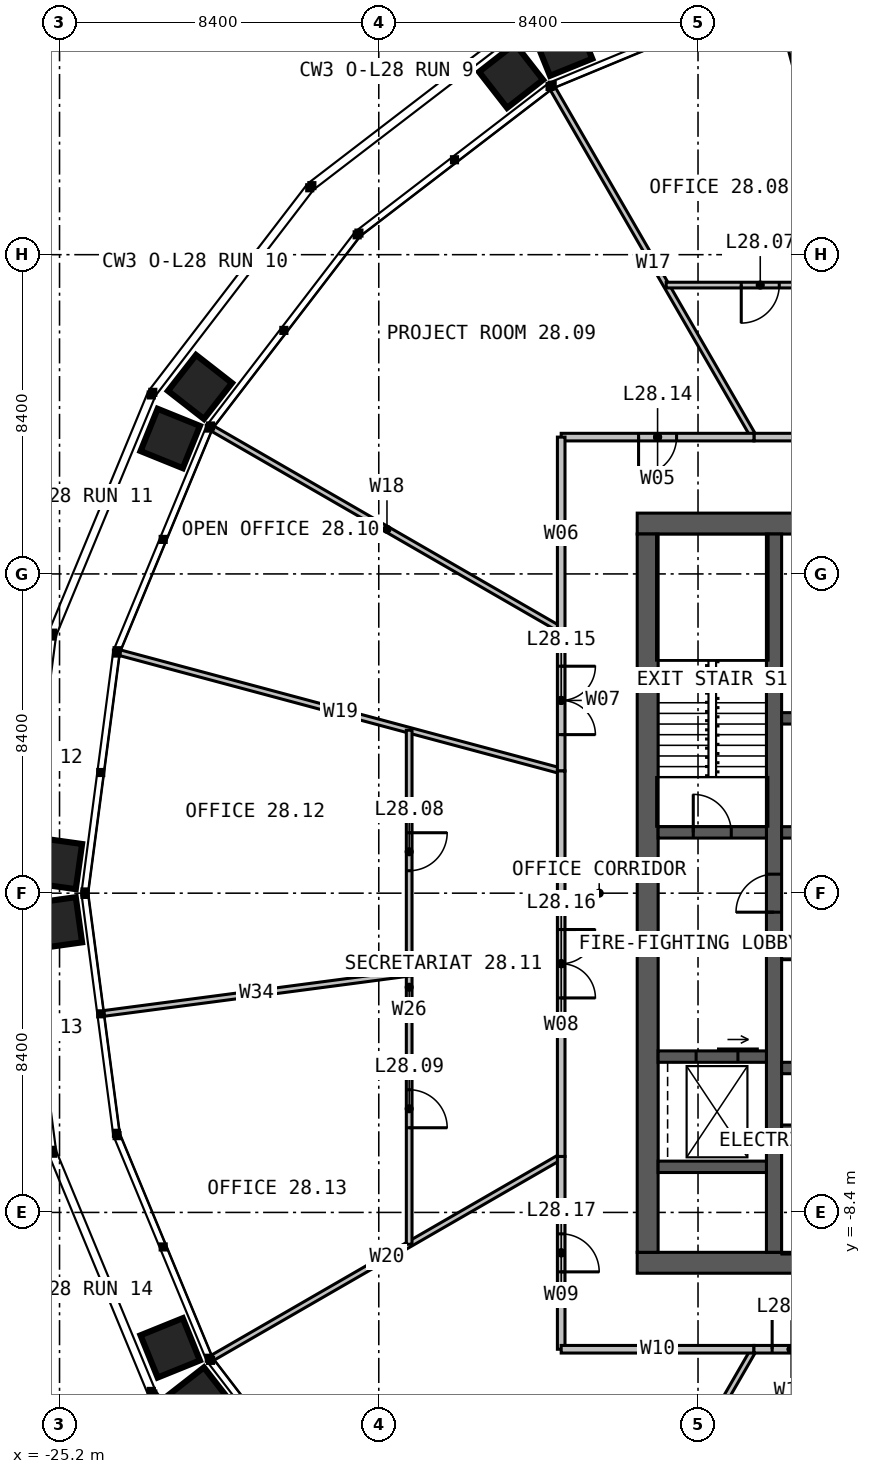
"""IFC4 building model, lengths in metres.
Left out: names, types, materials, properties, quantities, classifications, styles, units other than length and angle.
Written with IfcOpenShell. Run it as: python <this file> out.ifc"""

import sys

from ifc_helpers import new_model, si_unit, direction, frame, frame_2d, origin, place, context, subcontext, project, spatial, rectangle, extrude, element, fill, save


model = new_model("IFC4")
c1 = context("Model", 3, precision=1e-05, world=origin(), true_north=direction((0.0, 1.0)))
c2 = subcontext(c1, "Body", "Model", "MODEL_VIEW")
j1 = project(units=[si_unit("LENGTHUNIT", "METRE"), si_unit("PLANEANGLEUNIT", "RADIAN")], contexts=[c1])
p1 = place(None, origin())
s1 = spatial("IfcSite", under=j1, at=p1, CompositionType="ELEMENT")
p2 = place(p1, origin())
s2 = spatial("IfcBuilding", under=s1, at=p2, CompositionType="ELEMENT")
p3 = place(p2, frame((0.0, 0.0, 118.0)))
s3 = spatial("IfcBuildingStorey", under=s2, at=p3, CompositionType="ELEMENT", Elevation=118.0)
p4 = place(p3, frame((-10.0, 9.725, 0.0), z_axis=(0.0, 0.0, 1.0), x_axis=(1.0, 0.0, 0.0)))
e1 = element("IfcWall", 1, at=p4, inside=s3, PredefinedType="SOLIDWALL", context=c2, shape_type="SweptSolid", body=[
    extrude(rectangle(XDim=20.0, YDim=0.55, at=frame_2d((10.0, 0.0))), origin(), (0.0, 0.0, 1.0), 4.0),
])
p5 = place(p4, frame((9.4, 0.0, 0.0)))
e2 = element("IfcOpeningElement", 2, at=p5, cuts=e1, PredefinedType="OPENING", context=c2, shape_type="SweptSolid", body=[
    extrude(rectangle(XDim=1.2, YDim=2.2, at=frame_2d((0.6, 1.1))), frame((0.0, 0.285, 0.0), z_axis=(0.0, -1.0, 0.0), x_axis=(1.0, 0.0, 0.0)), (0.0, 0.0, 1.0), 0.57),
])
p6 = place(p3, frame((10.0, -9.725, 0.0), z_axis=(0.0, 0.0, 1.0), x_axis=(-1.0, 0.0, 0.0)))
e3 = element("IfcWall", 3, at=p6, inside=s3, PredefinedType="SOLIDWALL", context=c2, shape_type="SweptSolid", body=[
    extrude(rectangle(XDim=20.0, YDim=0.55, at=frame_2d((10.0, 0.0))), origin(), (0.0, 0.0, 1.0), 4.0),
])
p7 = place(p6, frame((6.875, 0.0, 0.0)))
e4 = element("IfcOpeningElement", 4, at=p7, cuts=e3, PredefinedType="OPENING", context=c2, shape_type="SweptSolid", body=[
    extrude(rectangle(XDim=1.2, YDim=2.2, at=frame_2d((0.6, 1.1))), frame((0.0, 0.285, 0.0), z_axis=(0.0, -1.0, 0.0), x_axis=(1.0, 0.0, 0.0)), (0.0, 0.0, 1.0), 0.57),
])
p8 = place(p3, frame((-9.725, 9.45, 0.0), z_axis=(0.0, 0.0, 1.0), x_axis=(0.0, -1.0, 0.0)))
e5 = element("IfcWall", 5, at=p8, inside=s3, PredefinedType="SOLIDWALL", context=c2, shape_type="SweptSolid", body=[
    extrude(rectangle(XDim=18.9, YDim=0.55, at=frame_2d((9.45, 0.0))), origin(), (0.0, 0.0, 1.0), 4.0),
])
p9 = place(p3, frame((-6.4, -9.45, 0.0), z_axis=(0.0, 0.0, 1.0), x_axis=(0.0, 1.0, 0.0)))
e6 = element("IfcWall", 6, at=p9, inside=s3, PredefinedType="SOLIDWALL", context=c2, shape_type="SweptSolid", body=[
    extrude(rectangle(XDim=18.9, YDim=0.4, at=frame_2d((9.45, 0.0))), origin(), (0.0, 0.0, 1.0), 4.0),
])
p10 = place(p9, frame((8.95, 0.0, 0.0)))
e7 = element("IfcOpeningElement", 7, at=p10, cuts=e6, PredefinedType="OPENING", context=c2, shape_type="SweptSolid", body=[
    extrude(rectangle(XDim=1.0, YDim=2.2, at=frame_2d((0.5, 1.1))), frame((0.0, 0.21, 0.0), z_axis=(0.0, -1.0, 0.0), x_axis=(1.0, 0.0, 0.0)), (0.0, 0.0, 1.0), 0.42),
])
p11 = place(p3, frame((-6.2, 1.6, 0.0), z_axis=(0.0, 0.0, 1.0), x_axis=(1.0, 0.0, 0.0)))
e8 = element("IfcWall", 8, at=p11, inside=s3, PredefinedType="SOLIDWALL", context=c2, shape_type="SweptSolid", body=[
    extrude(rectangle(XDim=4.85, YDim=0.3, at=frame_2d((2.425, 0.0))), origin(), (0.0, 0.0, 1.0), 4.0),
])
p12 = place(p11, frame((0.625, 0.0, 0.0)))
e9 = element("IfcOpeningElement", 9, at=p12, cuts=e8, PredefinedType="OPENING", context=c2, shape_type="SweptSolid", body=[
    extrude(rectangle(XDim=1.1, YDim=2.2, at=frame_2d((0.55, 1.1))), frame((0.0, 0.16, 0.0), z_axis=(0.0, -1.0, 0.0), x_axis=(1.0, 0.0, 0.0)), (0.0, 0.0, 1.0), 0.32),
])
p13 = place(p11, frame((3.15, 0.0, 0.0)))
e10 = element("IfcOpeningElement", 10, at=p13, cuts=e8, PredefinedType="OPENING", context=c2, shape_type="SweptSolid", body=[
    extrude(rectangle(XDim=1.1, YDim=2.2, at=frame_2d((0.55, 1.1))), frame((0.0, 0.16, 0.0), z_axis=(0.0, -1.0, 0.0), x_axis=(1.0, 0.0, 0.0)), (0.0, 0.0, 1.0), 0.32),
])
p14 = place(p3, frame((-6.2, 4.6, 0.0), z_axis=(0.0, 0.0, 1.0), x_axis=(1.0, 0.0, 0.0)))
e11 = element("IfcWall", 11, at=p14, inside=s3, PredefinedType="SOLIDWALL", context=c2, shape_type="SweptSolid", body=[
    extrude(rectangle(XDim=4.85, YDim=0.3, at=frame_2d((2.425, 0.0))), origin(), (0.0, 0.0, 1.0), 4.0),
])
for number, where, z_axis, x_axis in (
    (12, (-6.2, -1.6, 0.0), (0.0, 0.0, 1.0), (1.0, 0.0, 0.0)),
    (13, (-6.2, -4.6, 0.0), (0.0, 0.0, 1.0), (1.0, 0.0, 0.0)),
):
    element("IfcWall", number, at=place(p3, frame(where, z_axis=z_axis, x_axis=x_axis)), inside=s3, PredefinedType="SOLIDWALL", context=c2, shape_type="SweptSolid", body=[
        extrude(rectangle(XDim=7.4, YDim=0.3, at=frame_2d((3.7, 0.0))), origin(), (0.0, 0.0, 1.0), 4.0),
    ])
p15 = place(p3, frame((-6.2, -6.2, 0.0), z_axis=(0.0, 0.0, 1.0), x_axis=(1.0, 0.0, 0.0)))
e14 = element("IfcWall", 14, at=p15, inside=s3, PredefinedType="SOLIDWALL", context=c2, shape_type="SweptSolid", body=[
    extrude(rectangle(XDim=7.4, YDim=0.2, at=frame_2d((3.7, 0.0))), origin(), (0.0, 0.0, 1.0), 4.0),
])
p16 = place(p3, frame((-9.45, 1.6, 0.0), z_axis=(0.0, 0.0, 1.0), x_axis=(1.0, 0.0, 0.0)))
e15 = element("IfcWall", 15, at=p16, inside=s3, PredefinedType="SOLIDWALL", context=c2, shape_type="SweptSolid", body=[
    extrude(rectangle(XDim=2.85, YDim=0.3, at=frame_2d((1.425, 0.0))), origin(), (0.0, 0.0, 1.0), 4.0),
])
p17 = place(p16, frame((0.925, 0.0, 0.0)))
e16 = element("IfcOpeningElement", 16, at=p17, cuts=e15, PredefinedType="OPENING", context=c2, shape_type="SweptSolid", body=[
    extrude(rectangle(XDim=1.0, YDim=2.2, at=frame_2d((0.5, 1.1))), frame((0.0, 0.16, 0.0), z_axis=(0.0, -1.0, 0.0), x_axis=(1.0, 0.0, 0.0)), (0.0, 0.0, 1.0), 0.32),
])
p18 = place(p3, frame((-9.45, -4.3, 0.0), z_axis=(0.0, 0.0, 1.0), x_axis=(1.0, 0.0, 0.0)))
e17 = element("IfcWall", 17, at=p18, inside=s3, PredefinedType="SOLIDWALL", context=c2, shape_type="SweptSolid", body=[
    extrude(rectangle(XDim=2.85, YDim=0.3, at=frame_2d((1.425, 0.0))), origin(), (0.0, 0.0, 1.0), 4.0),
])
p19 = place(p18, frame((1.0, 0.0, 0.0)))
e18 = element("IfcOpeningElement", 18, at=p19, cuts=e17, PredefinedType="OPENING", context=c2, shape_type="SweptSolid", body=[
    extrude(rectangle(XDim=1.1, YDim=2.2, at=frame_2d((0.55, 1.1))), frame((0.0, 0.16, 0.0), z_axis=(0.0, -1.0, 0.0), x_axis=(1.0, 0.0, 0.0)), (0.0, 0.0, 1.0), 0.32),
])
p20 = place(p3, frame((-9.45, -7.2, 0.0), z_axis=(0.0, 0.0, 1.0), x_axis=(1.0, 0.0, 0.0)))
e19 = element("IfcWall", 19, at=p20, inside=s3, PredefinedType="SOLIDWALL", context=c2, shape_type="SweptSolid", body=[
    extrude(rectangle(XDim=2.85, YDim=0.3, at=frame_2d((1.425, 0.0))), origin(), (0.0, 0.0, 1.0), 4.0),
])
for number, where, z_axis, x_axis in (
    (20, (-6.928, 12.0, 0.0), (0.0, 0.0, 1.0), (-0.5, 0.866, 0.0)),
    (21, (-12.0, 6.928, 0.0), (0.0, 0.0, 1.0), (-0.866, 0.5, 0.0)),
):
    element("IfcWall", number, at=place(p3, frame(where, z_axis=z_axis, x_axis=x_axis)), inside=s3, PredefinedType="PARTITIONING", context=c2, shape_type="SweptSolid", body=[
        extrude(rectangle(XDim=10.587, YDim=0.15, at=frame_2d((5.293, 0.0))), origin(), (0.0, 0.0, 1.0), 2.79),
    ])
p21 = place(p3, frame((-12.0, 3.215, 0.0), z_axis=(0.0, 0.0, 1.0), x_axis=(-0.965923753467, 0.258826780857, 0.0)))
e22 = element("IfcWall", 22, at=p21, inside=s3, PredefinedType="PARTITIONING", context=c2, shape_type="SweptSolid", body=[
    extrude(rectangle(XDim=12.02, YDim=0.15, at=frame_2d((6.01, 0.0))), origin(), (0.0, 0.0, 1.0), 2.79),
])
for number, where, z_axis, x_axis in (
    (23, (-12.0, -6.928, 0.0), (0.0, 0.0, 1.0), (-0.866, -0.5, 0.0)),
    (24, (-6.928, -12.0, 0.0), (0.0, 0.0, 1.0), (-0.5, -0.866, 0.0)),
):
    element("IfcWall", number, at=place(p3, frame(where, z_axis=z_axis, x_axis=x_axis)), inside=s3, PredefinedType="PARTITIONING", context=c2, shape_type="SweptSolid", body=[
        extrude(rectangle(XDim=10.587, YDim=0.15, at=frame_2d((5.293, 0.0))), origin(), (0.0, 0.0, 1.0), 2.79),
    ])
p22 = place(p3, frame((-4.97, -12.0, 0.0), z_axis=(0.0, 0.0, 1.0), x_axis=(-0.382686061022, -0.923878443682, 0.0)))
e25 = element("IfcWall", 25, at=p22, inside=s3, PredefinedType="PARTITIONING", context=c2, shape_type="SweptSolid", body=[
    extrude(rectangle(XDim=11.245, YDim=0.15, at=frame_2d((5.623, 0.0))), origin(), (0.0, 0.0, 1.0), 2.79),
])
p23 = place(p3, frame((9.238, 16.0, 0.0), z_axis=(0.0, 0.0, 1.0), x_axis=(-1.0, 0.0, 0.0)))
e26 = element("IfcWall", 26, at=p23, inside=s3, PredefinedType="PARTITIONING", context=c2, shape_type="SweptSolid", body=[
    extrude(rectangle(XDim=18.475, YDim=0.15, at=frame_2d((9.238, 0.0))), origin(), (0.0, 0.0, 1.0), 2.79),
])
p24 = place(p23, frame((1.975, 0.0, 0.0)))
e27 = element("IfcOpeningElement", 27, at=p24, cuts=e26, PredefinedType="OPENING", context=c2, shape_type="SweptSolid", body=[
    extrude(rectangle(XDim=1.0, YDim=2.2, at=frame_2d((0.5, 1.1))), frame((0.0, 0.085, 0.0), z_axis=(0.0, -1.0, 0.0), x_axis=(1.0, 0.0, 0.0)), (0.0, 0.0, 1.0), 0.17),
])
p25 = place(p23, frame((6.594, 0.0, 0.0)))
e28 = element("IfcOpeningElement", 28, at=p25, cuts=e26, PredefinedType="OPENING", context=c2, shape_type="SweptSolid", body=[
    extrude(rectangle(XDim=1.0, YDim=2.2, at=frame_2d((0.5, 1.1))), frame((0.0, 0.085, 0.0), z_axis=(0.0, -1.0, 0.0), x_axis=(1.0, 0.0, 0.0)), (0.0, 0.0, 1.0), 0.17),
])
p26 = place(p23, frame((10.881, 0.0, 0.0)))
e29 = element("IfcOpeningElement", 29, at=p26, cuts=e26, PredefinedType="OPENING", context=c2, shape_type="SweptSolid", body=[
    extrude(rectangle(XDim=1.0, YDim=2.2, at=frame_2d((0.5, 1.1))), frame((0.0, 0.085, 0.0), z_axis=(0.0, -1.0, 0.0), x_axis=(1.0, 0.0, 0.0)), (0.0, 0.0, 1.0), 0.17),
])
p27 = place(p23, frame((15.5, 0.0, 0.0)))
e30 = element("IfcOpeningElement", 30, at=p27, cuts=e26, PredefinedType="OPENING", context=c2, shape_type="SweptSolid", body=[
    extrude(rectangle(XDim=1.0, YDim=2.2, at=frame_2d((0.5, 1.1))), frame((0.0, 0.085, 0.0), z_axis=(0.0, -1.0, 0.0), x_axis=(1.0, 0.0, 0.0)), (0.0, 0.0, 1.0), 0.17),
])
p28 = place(p3, frame((-4.287, 16.0, 0.0), z_axis=(0.0, 0.0, 1.0), x_axis=(-0.258833147156, 0.965922047545, 0.0)))
e31 = element("IfcWall", 31, at=p28, inside=s3, PredefinedType="PARTITIONING", context=c2, shape_type="SweptSolid", body=[
    extrude(rectangle(XDim=7.879, YDim=0.15, at=frame_2d((3.939, 0.0))), origin(), (0.0, 0.0, 1.0), 2.79),
])
p29 = place(p3, frame((6.928, 12.0, 0.0), z_axis=(0.0, 0.0, 1.0), x_axis=(-1.0, 0.0, 0.0)))
e32 = element("IfcWall", 32, at=p29, inside=s3, PredefinedType="PARTITIONING", context=c2, shape_type="SweptSolid", body=[
    extrude(rectangle(XDim=13.856, YDim=0.2, at=frame_2d((6.928, 0.0))), origin(), (0.0, 0.0, 1.0), 3.8),
])
p30 = place(p29, frame((6.028, 0.0, 0.0)))
e33 = element("IfcOpeningElement", 33, at=p30, cuts=e32, PredefinedType="OPENING", context=c2, shape_type="SweptSolid", body=[
    extrude(rectangle(XDim=1.8, YDim=2.2, at=frame_2d((0.9, 1.1))), frame((0.0, 0.11, 0.0), z_axis=(0.0, -1.0, 0.0), x_axis=(1.0, 0.0, 0.0)), (0.0, 0.0, 1.0), 0.22),
])
p31 = place(p3, frame((-6.928, 12.0, 0.0), z_axis=(0.0, 0.0, 1.0), x_axis=(-1.0, 0.0, 0.0)))
e34 = element("IfcWall", 34, at=p31, inside=s3, PredefinedType="PARTITIONING", context=c2, shape_type="SweptSolid", body=[
    extrude(rectangle(XDim=5.072, YDim=0.2, at=frame_2d((2.536, 0.0))), origin(), (0.0, 0.0, 1.0), 3.8),
])
p32 = place(p31, frame((2.036, 0.0, 0.0)))
e35 = element("IfcOpeningElement", 35, at=p32, cuts=e34, PredefinedType="OPENING", context=c2, shape_type="SweptSolid", body=[
    extrude(rectangle(XDim=1.0, YDim=2.2, at=frame_2d((0.5, 1.1))), frame((0.0, 0.11, 0.0), z_axis=(0.0, -1.0, 0.0), x_axis=(1.0, 0.0, 0.0)), (0.0, 0.0, 1.0), 0.22),
])
p33 = place(p3, frame((-12.0, 12.0, 0.0), z_axis=(0.0, 0.0, 1.0), x_axis=(0.0, -1.0, 0.0)))
e36 = element("IfcWall", 36, at=p33, inside=s3, PredefinedType="PARTITIONING", context=c2, shape_type="SweptSolid", body=[
    extrude(rectangle(XDim=5.072, YDim=0.2, at=frame_2d((2.536, 0.0))), origin(), (0.0, 0.0, 1.0), 3.8),
])
p34 = place(p3, frame((-12.0, 6.928, 0.0), z_axis=(0.0, 0.0, 1.0), x_axis=(0.0, -1.0, 0.0)))
e37 = element("IfcWall", 37, at=p34, inside=s3, PredefinedType="PARTITIONING", context=c2, shape_type="SweptSolid", body=[
    extrude(rectangle(XDim=3.713, YDim=0.2, at=frame_2d((1.856, 0.0))), origin(), (0.0, 0.0, 1.0), 3.8),
])
p35 = place(p34, frame((0.956, 0.0, 0.0)))
e38 = element("IfcOpeningElement", 38, at=p35, cuts=e37, PredefinedType="OPENING", context=c2, shape_type="SweptSolid", body=[
    extrude(rectangle(XDim=1.8, YDim=2.2, at=frame_2d((0.9, 1.1))), frame((0.0, 0.11, 0.0), z_axis=(0.0, -1.0, 0.0), x_axis=(1.0, 0.0, 0.0)), (0.0, 0.0, 1.0), 0.22),
])
p36 = place(p3, frame((-16.0, 4.287, 0.0), z_axis=(0.0, 0.0, 1.0), x_axis=(0.0, -1.0, 0.0)))
e39 = element("IfcWall", 39, at=p36, inside=s3, PredefinedType="PARTITIONING", context=c2, shape_type="SweptSolid", body=[
    extrude(rectangle(XDim=13.525, YDim=0.15, at=frame_2d((6.762, 0.0))), origin(), (0.0, 0.0, 1.0), 2.79),
])
p37 = place(p36, frame((2.697, 0.0, 0.0)))
e40 = element("IfcOpeningElement", 40, at=p37, cuts=e39, PredefinedType="OPENING", context=c2, shape_type="SweptSolid", body=[
    extrude(rectangle(XDim=1.0, YDim=2.2, at=frame_2d((0.5, 1.1))), frame((0.0, 0.085, 0.0), z_axis=(0.0, -1.0, 0.0), x_axis=(1.0, 0.0, 0.0)), (0.0, 0.0, 1.0), 0.17),
])
p38 = place(p36, frame((9.459, 0.0, 0.0)))
e41 = element("IfcOpeningElement", 41, at=p38, cuts=e39, PredefinedType="OPENING", context=c2, shape_type="SweptSolid", body=[
    extrude(rectangle(XDim=1.0, YDim=2.2, at=frame_2d((0.5, 1.1))), frame((0.0, 0.085, 0.0), z_axis=(0.0, -1.0, 0.0), x_axis=(1.0, 0.0, 0.0)), (0.0, 0.0, 1.0), 0.17),
])
p39 = place(p3, frame((-16.0, -2.106, 0.0), z_axis=(0.0, 0.0, 1.0), x_axis=(-0.99144669858, -0.130512236494, 0.0)))
e42 = element("IfcWall", 42, at=p39, inside=s3, PredefinedType="PARTITIONING", context=c2, shape_type="SweptSolid", body=[
    extrude(rectangle(XDim=8.096, YDim=0.15, at=frame_2d((4.048, 0.0))), origin(), (0.0, 0.0, 1.0), 2.79),
])
p40 = place(p3, frame((-12.0, 3.215, 0.0), z_axis=(0.0, 0.0, 1.0), x_axis=(0.0, -1.0, 0.0)))
e43 = element("IfcWall", 43, at=p40, inside=s3, PredefinedType="PARTITIONING", context=c2, shape_type="SweptSolid", body=[
    extrude(rectangle(XDim=10.144, YDim=0.2, at=frame_2d((5.072, 0.0))), origin(), (0.0, 0.0, 1.0), 3.8),
])
p41 = place(p40, frame((4.172, 0.0, 0.0)))
e44 = element("IfcOpeningElement", 44, at=p41, cuts=e43, PredefinedType="OPENING", context=c2, shape_type="SweptSolid", body=[
    extrude(rectangle(XDim=1.8, YDim=2.2, at=frame_2d((0.9, 1.1))), frame((0.0, 0.11, 0.0), z_axis=(0.0, -1.0, 0.0), x_axis=(1.0, 0.0, 0.0)), (0.0, 0.0, 1.0), 0.22),
])
p42 = place(p3, frame((-12.0, -6.928, 0.0), z_axis=(0.0, 0.0, 1.0), x_axis=(0.0, -1.0, 0.0)))
e45 = element("IfcWall", 45, at=p42, inside=s3, PredefinedType="PARTITIONING", context=c2, shape_type="SweptSolid", body=[
    extrude(rectangle(XDim=5.072, YDim=0.2, at=frame_2d((2.536, 0.0))), origin(), (0.0, 0.0, 1.0), 3.8),
])
p43 = place(p42, frame((2.036, 0.0, 0.0)))
e46 = element("IfcOpeningElement", 46, at=p43, cuts=e45, PredefinedType="OPENING", context=c2, shape_type="SweptSolid", body=[
    extrude(rectangle(XDim=1.0, YDim=2.2, at=frame_2d((0.5, 1.1))), frame((0.0, 0.11, 0.0), z_axis=(0.0, -1.0, 0.0), x_axis=(1.0, 0.0, 0.0)), (0.0, 0.0, 1.0), 0.22),
])
p44 = place(p3, frame((-12.0, -12.0, 0.0), z_axis=(0.0, 0.0, 1.0), x_axis=(1.0, 0.0, 0.0)))
e47 = element("IfcWall", 47, at=p44, inside=s3, PredefinedType="PARTITIONING", context=c2, shape_type="SweptSolid", body=[
    extrude(rectangle(XDim=5.072, YDim=0.2, at=frame_2d((2.536, 0.0))), origin(), (0.0, 0.0, 1.0), 3.8),
])
p45 = place(p3, frame((-6.928, -12.0, 0.0), z_axis=(0.0, 0.0, 1.0), x_axis=(1.0, 0.0, 0.0)))
e48 = element("IfcWall", 48, at=p45, inside=s3, PredefinedType="PARTITIONING", context=c2, shape_type="SweptSolid", body=[
    extrude(rectangle(XDim=1.958, YDim=0.2, at=frame_2d((0.979, 0.0))), origin(), (0.0, 0.0, 1.0), 3.8),
])
p46 = place(p45, frame((0.479, 0.0, 0.0)))
e49 = element("IfcOpeningElement", 49, at=p46, cuts=e48, PredefinedType="OPENING", context=c2, shape_type="SweptSolid", body=[
    extrude(rectangle(XDim=1.0, YDim=2.2, at=frame_2d((0.5, 1.1))), frame((0.0, 0.11, 0.0), z_axis=(0.0, -1.0, 0.0), x_axis=(1.0, 0.0, 0.0)), (0.0, 0.0, 1.0), 0.22),
])
p47 = place(p10, origin())
e50 = element("IfcDoor", 50, at=p47, inside=s3, OperationType="SINGLE_SWING_LEFT", PredefinedType="DOOR", context=c2, shape_type="SweptSolid", body=[
    extrude(rectangle(XDim=1.0, YDim=2.2, at=frame_2d((0.5, 1.1))), frame((0.0, 0.025, 0.0), z_axis=(0.0, -1.0, 0.0), x_axis=(1.0, 0.0, 0.0)), (0.0, 0.0, 1.0), 0.05),
])
fill(e7, e50)
p48 = place(p17, origin())
e51 = element("IfcDoor", 51, at=p48, inside=s3, OperationType="SINGLE_SWING_LEFT", PredefinedType="DOOR", context=c2, shape_type="SweptSolid", body=[
    extrude(rectangle(XDim=1.0, YDim=2.2, at=frame_2d((0.5, 1.1))), frame((0.0, 0.025, 0.0), z_axis=(0.0, -1.0, 0.0), x_axis=(1.0, 0.0, 0.0)), (0.0, 0.0, 1.0), 0.05),
])
fill(e16, e51)
p49 = place(p19, origin())
e52 = element("IfcDoor", 52, at=p49, inside=s3, OperationType="SLIDING_TO_LEFT", PredefinedType="DOOR", context=c2, shape_type="SweptSolid", body=[
    extrude(rectangle(XDim=1.1, YDim=2.2, at=frame_2d((0.55, 1.1))), frame((0.0, 0.025, 0.0), z_axis=(0.0, -1.0, 0.0), x_axis=(1.0, 0.0, 0.0)), (0.0, 0.0, 1.0), 0.05),
])
fill(e18, e52)
p50 = place(p27, origin())
e53 = element("IfcDoor", 53, at=p50, inside=s3, OperationType="SINGLE_SWING_RIGHT", PredefinedType="DOOR", context=c2, shape_type="SweptSolid", body=[
    extrude(rectangle(XDim=1.0, YDim=2.2, at=frame_2d((0.5, 1.1))), frame((0.0, 0.025, 0.0), z_axis=(0.0, -1.0, 0.0), x_axis=(1.0, 0.0, 0.0)), (0.0, 0.0, 1.0), 0.05),
])
fill(e30, e53)
p51 = place(p32, origin())
e54 = element("IfcDoor", 54, at=p51, inside=s3, OperationType="SINGLE_SWING_RIGHT", PredefinedType="DOOR", context=c2, shape_type="SweptSolid", body=[
    extrude(rectangle(XDim=1.0, YDim=2.2, at=frame_2d((0.5, 1.1))), frame((0.0, 0.025, 0.0), z_axis=(0.0, -1.0, 0.0), x_axis=(1.0, 0.0, 0.0)), (0.0, 0.0, 1.0), 0.05),
])
fill(e35, e54)
p52 = place(p35, origin())
e55 = element("IfcDoor", 55, at=p52, inside=s3, OperationType="DOUBLE_DOOR_SINGLE_SWING", PredefinedType="DOOR", context=c2, shape_type="SweptSolid", body=[
    extrude(rectangle(XDim=1.8, YDim=2.2, at=frame_2d((0.9, 1.1))), frame((0.0, 0.025, 0.0), z_axis=(0.0, -1.0, 0.0), x_axis=(1.0, 0.0, 0.0)), (0.0, 0.0, 1.0), 0.05),
])
fill(e38, e55)
p53 = place(p37, origin())
e56 = element("IfcDoor", 56, at=p53, inside=s3, OperationType="SINGLE_SWING_LEFT", PredefinedType="DOOR", context=c2, shape_type="SweptSolid", body=[
    extrude(rectangle(XDim=1.0, YDim=2.2, at=frame_2d((0.5, 1.1))), frame((0.0, 0.025, 0.0), z_axis=(0.0, -1.0, 0.0), x_axis=(1.0, 0.0, 0.0)), (0.0, 0.0, 1.0), 0.05),
])
fill(e40, e56)
p54 = place(p38, origin())
e57 = element("IfcDoor", 57, at=p54, inside=s3, OperationType="SINGLE_SWING_RIGHT", PredefinedType="DOOR", context=c2, shape_type="SweptSolid", body=[
    extrude(rectangle(XDim=1.0, YDim=2.2, at=frame_2d((0.5, 1.1))), frame((0.0, 0.025, 0.0), z_axis=(0.0, -1.0, 0.0), x_axis=(1.0, 0.0, 0.0)), (0.0, 0.0, 1.0), 0.05),
])
fill(e41, e57)
p55 = place(p41, origin())
e58 = element("IfcDoor", 58, at=p55, inside=s3, OperationType="DOUBLE_DOOR_SINGLE_SWING", PredefinedType="DOOR", context=c2, shape_type="SweptSolid", body=[
    extrude(rectangle(XDim=1.8, YDim=2.2, at=frame_2d((0.9, 1.1))), frame((0.0, 0.025, 0.0), z_axis=(0.0, -1.0, 0.0), x_axis=(1.0, 0.0, 0.0)), (0.0, 0.0, 1.0), 0.05),
])
fill(e44, e58)
p56 = place(p43, origin())
e59 = element("IfcDoor", 59, at=p56, inside=s3, OperationType="SINGLE_SWING_RIGHT", PredefinedType="DOOR", context=c2, shape_type="SweptSolid", body=[
    extrude(rectangle(XDim=1.0, YDim=2.2, at=frame_2d((0.5, 1.1))), frame((0.0, 0.025, 0.0), z_axis=(0.0, -1.0, 0.0), x_axis=(1.0, 0.0, 0.0)), (0.0, 0.0, 1.0), 0.05),
])
fill(e46, e59)
p57 = place(p46, origin())
e60 = element("IfcDoor", 60, at=p57, inside=s3, OperationType="SINGLE_SWING_LEFT", PredefinedType="DOOR", context=c2, shape_type="SweptSolid", body=[
    extrude(rectangle(XDim=1.0, YDim=2.2, at=frame_2d((0.5, 1.1))), frame((0.0, 0.025, 0.0), z_axis=(0.0, -1.0, 0.0), x_axis=(1.0, 0.0, 0.0)), (0.0, 0.0, 1.0), 0.05),
])
fill(e49, e60)
save(model, sys.argv[1])
